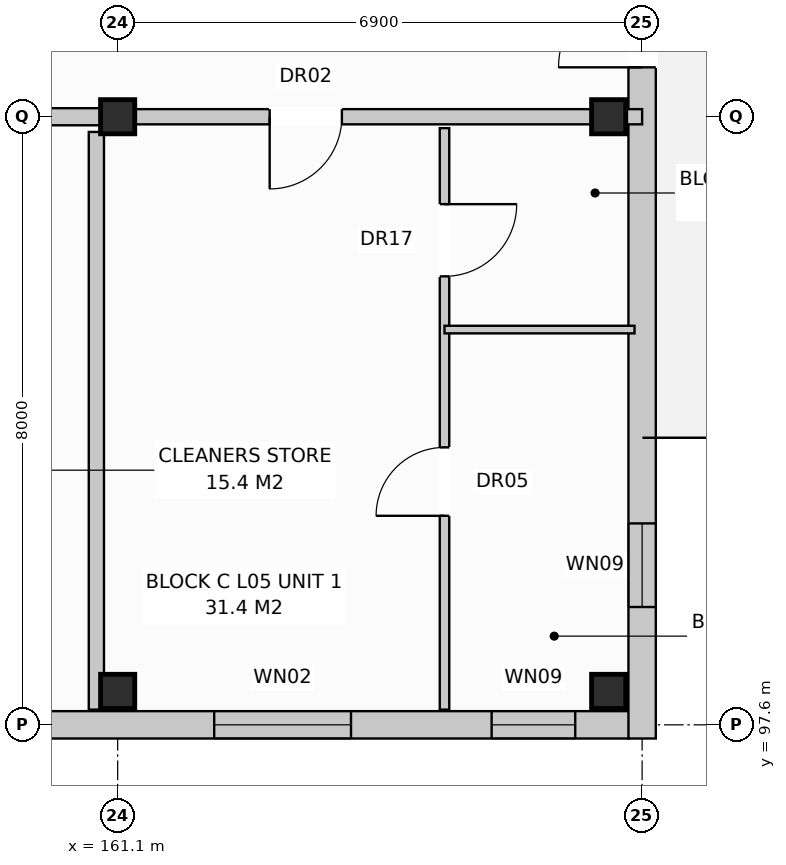
"""IFC4 building model, lengths in metres.
Left out: names, types, materials, properties, quantities, classifications, styles, units other than length and angle.
Written with IfcOpenShell. Run it as: python <this file> out.ifc"""

import sys

from ifc_helpers import new_model, si_unit, direction, frame, frame_2d, origin, origin_with_axes, origin_2d, place, context, subcontext, project, spatial, rectangle, extrude, element, fill, save


model = new_model("IFC4")
c1 = context("Model", 3, precision=1e-05, world=origin(), true_north=direction((0.0, 1.0)))
c2 = subcontext(c1, "Body", "Model", "MODEL_VIEW")
j1 = project(units=[si_unit("LENGTHUNIT", "METRE"), si_unit("PLANEANGLEUNIT", "RADIAN")], contexts=[c1])
p1 = place(None, origin())
s1 = spatial("IfcSite", under=j1, at=p1, CompositionType="ELEMENT")
p2 = place(p1, origin())
s2 = spatial("IfcBuilding", under=s1, at=p2, CompositionType="ELEMENT")
p3 = place(p2, frame((0.0, 0.0, 17.6)))
s3 = spatial("IfcBuildingStorey", under=s2, at=p3, CompositionType="ELEMENT", Elevation=17.6)
for number, where, z_axis, x_axis in (
    (1, (161.1, 98.04, 0.0), (0.0, 0.0, 1.0), (1.0, 0.0, 0.0)),
    (2, (161.1, 105.6, 0.0), (0.0, 0.0, 1.0), (1.0, 0.0, 0.0)),
    (3, (167.56, 98.04, 0.0), (0.0, 0.0, 1.0), (1.0, 0.0, 0.0)),
    (4, (167.56, 105.6, 0.0), (0.0, 0.0, 1.0), (1.0, 0.0, 0.0)),
):
    element("IfcColumn", number, at=place(p3, frame(where, z_axis=z_axis, x_axis=x_axis)), inside=s3, PredefinedType="COLUMN", context=c2, shape_type="SweptSolid", body=[
        extrude(rectangle(XDim=0.45, YDim=0.45, at=origin_2d()), origin(), (0.0, 0.0, 1.0), 3.2),
    ])
p4 = place(p3, frame((151.05, 97.6, 0.0), z_axis=(0.0, 0.0, 1.0), x_axis=(1.0, 0.0, 0.0)))
e5 = element("IfcWall", 5, at=p4, inside=s3, PredefinedType="STANDARD", context=c2, shape_type="SweptSolid", body=[
    extrude(rectangle(XDim=16.78, YDim=0.36, at=frame_2d((8.39, 0.0))), origin(), (0.0, 0.0, 1.0), 2.95),
])
p5 = place(p4, frame((11.32, 0.0, 0.8)))
e6 = element("IfcOpeningElement", 6, at=p5, cuts=e5, PredefinedType="OPENING", context=c2, shape_type="SweptSolid", body=[
    extrude(rectangle(XDim=1.8, YDim=1.7, at=frame_2d((0.9, 0.85))), frame((0.0, 0.192, 0.0), z_axis=(0.0, -1.0, 0.0), x_axis=(1.0, 0.0, 0.0)), (0.0, 0.0, 1.0), 0.384),
])
p6 = place(p4, frame((14.97, 0.0, 0.72)))
e7 = element("IfcOpeningElement", 7, at=p6, cuts=e5, PredefinedType="OPENING", context=c2, shape_type="SweptSolid", body=[
    extrude(rectangle(XDim=1.1, YDim=1.5, at=frame_2d((0.55, 0.75))), frame((0.0, 0.192, 0.0), z_axis=(0.0, -1.0, 0.0), x_axis=(1.0, 0.0, 0.0)), (0.0, 0.0, 1.0), 0.384),
])
p7 = place(p3, frame((168.0, 97.42, 0.0), z_axis=(0.0, 0.0, 1.0), x_axis=(0.0, 1.0, 0.0)))
e8 = element("IfcWall", 8, at=p7, inside=s3, PredefinedType="STANDARD", context=c2, shape_type="SweptSolid", body=[
    extrude(rectangle(XDim=18.76, YDim=0.36, at=frame_2d((9.38, 0.0))), origin(), (0.0, 0.0, 1.0), 2.95),
])
p8 = place(p7, frame((8.83, 0.0, 0.0)))
e9 = element("IfcOpeningElement", 9, at=p8, cuts=e8, PredefinedType="OPENING", context=c2, shape_type="SweptSolid", body=[
    extrude(rectangle(XDim=1.1, YDim=2.1, at=frame_2d((0.55, 1.05))), frame((0.0, 0.192, 0.0), z_axis=(0.0, -1.0, 0.0), x_axis=(1.0, 0.0, 0.0)), (0.0, 0.0, 1.0), 0.384),
])
p9 = place(p7, frame((1.73, 0.0, 0.72)))
e10 = element("IfcOpeningElement", 10, at=p9, cuts=e8, PredefinedType="OPENING", context=c2, shape_type="SweptSolid", body=[
    extrude(rectangle(XDim=1.1, YDim=1.5, at=frame_2d((0.55, 0.75))), frame((0.0, 0.192, 0.0), z_axis=(0.0, -1.0, 0.0), x_axis=(1.0, 0.0, 0.0)), (0.0, 0.0, 1.0), 0.384),
])
p10 = place(p7, frame((15.93, 0.0, 0.72)))
e11 = element("IfcOpeningElement", 11, at=p10, cuts=e8, PredefinedType="OPENING", context=c2, shape_type="SweptSolid", body=[
    extrude(rectangle(XDim=1.1, YDim=1.5, at=frame_2d((0.55, 0.75))), frame((0.0, 0.192, 0.0), z_axis=(0.0, -1.0, 0.0), x_axis=(1.0, 0.0, 0.0)), (0.0, 0.0, 1.0), 0.384),
])
p11 = place(p3, frame((160.82, 97.8, 0.0), z_axis=(0.0, 0.0, 1.0), x_axis=(0.0, 1.0, 0.0)))
e12 = element("IfcWall", 12, at=p11, inside=s3, PredefinedType="PARTITIONING", context=c2, shape_type="SweptSolid", body=[
    extrude(rectangle(XDim=7.6, YDim=0.2, at=frame_2d((3.8, 0.0))), origin(), (0.0, 0.0, 1.0), 2.39),
])
p12 = place(p3, frame((151.2, 105.6, 0.0), z_axis=(0.0, 0.0, 1.0), x_axis=(1.0, 0.0, 0.0)))
e13 = element("IfcWall", 13, at=p12, inside=s3, PredefinedType="PARTITIONING", context=c2, shape_type="SweptSolid", body=[
    extrude(rectangle(XDim=9.9, YDim=0.225, at=frame_2d((4.95, 0.0))), origin(), (0.0, 0.0, 1.0), 2.39),
])
p13 = place(p12, frame((0.475, 0.0, 0.0)))
e14 = element("IfcOpeningElement", 14, at=p13, cuts=e13, PredefinedType="OPENING", context=c2, shape_type="SweptSolid", body=[
    extrude(rectangle(XDim=1.1, YDim=2.15, at=frame_2d((0.55, 1.075))), frame((0.0, 0.125, 0.0), z_axis=(0.0, -1.0, 0.0), x_axis=(1.0, 0.0, 0.0)), (0.0, 0.0, 1.0), 0.249),
])
p14 = place(p12, frame((5.75, 0.0, 0.0)))
e15 = element("IfcOpeningElement", 15, at=p14, cuts=e13, PredefinedType="OPENING", context=c2, shape_type="SweptSolid", body=[
    extrude(rectangle(XDim=0.9, YDim=2.1, at=frame_2d((0.45, 1.05))), frame((0.0, 0.125, 0.0), z_axis=(0.0, -1.0, 0.0), x_axis=(1.0, 0.0, 0.0)), (0.0, 0.0, 1.0), 0.249),
])
p15 = place(p12, frame((7.8, 0.0, 0.0)))
e16 = element("IfcOpeningElement", 16, at=p15, cuts=e13, PredefinedType="OPENING", context=c2, shape_type="SweptSolid", body=[
    extrude(rectangle(XDim=0.95, YDim=2.15, at=frame_2d((0.475, 1.075))), frame((0.0, 0.125, 0.0), z_axis=(0.0, -1.0, 0.0), x_axis=(1.0, 0.0, 0.0)), (0.0, 0.0, 1.0), 0.249),
])
p16 = place(p3, frame((161.1, 105.6, 0.0), z_axis=(0.0, 0.0, 1.0), x_axis=(1.0, 0.0, 0.0)))
e17 = element("IfcWall", 17, at=p16, inside=s3, PredefinedType="PARTITIONING", context=c2, shape_type="SweptSolid", body=[
    extrude(rectangle(XDim=6.9, YDim=0.2, at=frame_2d((3.45, 0.0))), origin(), (0.0, 0.0, 1.0), 2.39),
])
p17 = place(p16, frame((2.0, 0.0, 0.0)))
e18 = element("IfcOpeningElement", 18, at=p17, cuts=e17, PredefinedType="OPENING", context=c2, shape_type="SweptSolid", body=[
    extrude(rectangle(XDim=0.95, YDim=2.15, at=frame_2d((0.475, 1.075))), frame((0.0, 0.112, 0.0), z_axis=(0.0, -1.0, 0.0), x_axis=(1.0, 0.0, 0.0)), (0.0, 0.0, 1.0), 0.224),
])
p18 = place(p3, frame((165.4, 105.45, 0.0), z_axis=(0.0, 0.0, 1.0), x_axis=(0.0, -1.0, 0.0)))
e19 = element("IfcWall", 19, at=p18, inside=s3, PredefinedType="PARTITIONING", context=c2, shape_type="SweptSolid", body=[
    extrude(rectangle(XDim=7.65, YDim=0.125, at=frame_2d((3.825, 0.0))), origin(), (0.0, 0.0, 1.0), 2.95),
])
p19 = place(p18, frame((1.0, 0.0, 0.0)))
e20 = element("IfcOpeningElement", 20, at=p19, cuts=e19, PredefinedType="OPENING", context=c2, shape_type="SweptSolid", body=[
    extrude(rectangle(XDim=0.95, YDim=2.1, at=frame_2d((0.475, 1.05))), frame((0.0, 0.074, 0.0), z_axis=(0.0, -1.0, 0.0), x_axis=(1.0, 0.0, 0.0)), (0.0, 0.0, 1.0), 0.149),
])
p20 = place(p18, frame((4.2, 0.0, 0.0)))
e21 = element("IfcOpeningElement", 21, at=p20, cuts=e19, PredefinedType="OPENING", context=c2, shape_type="SweptSolid", body=[
    extrude(rectangle(XDim=0.9, YDim=2.1, at=frame_2d((0.45, 1.05))), frame((0.0, 0.074, 0.0), z_axis=(0.0, -1.0, 0.0), x_axis=(1.0, 0.0, 0.0)), (0.0, 0.0, 1.0), 0.149),
])
p21 = place(p3, frame((165.4, 102.8, 0.0), z_axis=(0.0, 0.0, 1.0), x_axis=(1.0, 0.0, 0.0)))
e22 = element("IfcWall", 22, at=p21, inside=s3, PredefinedType="PARTITIONING", context=c2, shape_type="SweptSolid", body=[
    extrude(rectangle(XDim=2.5, YDim=0.1, at=frame_2d((1.25, 0.0))), origin(), (0.0, 0.0, 1.0), 2.95),
])
p22 = place(p5, origin_with_axes())
e23 = element("IfcWindow", 23, at=p22, inside=s3, PartitioningType="SINGLE_PANEL", PredefinedType="WINDOW", context=c2, shape_type="SweptSolid", body=[
    extrude(rectangle(XDim=1.8, YDim=1.7, at=frame_2d((0.9, 0.85))), frame((0.0, 0.03, 0.0), z_axis=(0.0, -1.0, 0.0), x_axis=(1.0, 0.0, 0.0)), (0.0, 0.0, 1.0), 0.06),
])
fill(e6, e23)
p23 = place(p6, origin_with_axes())
e24 = element("IfcWindow", 24, at=p23, inside=s3, PartitioningType="SINGLE_PANEL", PredefinedType="WINDOW", context=c2, shape_type="SweptSolid", body=[
    extrude(rectangle(XDim=1.1, YDim=1.5, at=frame_2d((0.55, 0.75))), frame((0.0, 0.03, 0.0), z_axis=(0.0, -1.0, 0.0), x_axis=(1.0, 0.0, 0.0)), (0.0, 0.0, 1.0), 0.06),
])
fill(e7, e24)
p24 = place(p8, origin_with_axes())
e25 = element("IfcDoor", 25, at=p24, inside=s3, OperationType="SINGLE_SWING_LEFT", PredefinedType="DOOR", context=c2, shape_type="SweptSolid", body=[
    extrude(rectangle(XDim=1.1, YDim=2.1, at=frame_2d((0.55, 1.05))), frame((0.0, 0.025, 0.0), z_axis=(0.0, -1.0, 0.0), x_axis=(1.0, 0.0, 0.0)), (0.0, 0.0, 1.0), 0.05),
])
fill(e9, e25)
p25 = place(p9, origin_with_axes())
e26 = element("IfcWindow", 26, at=p25, inside=s3, PartitioningType="SINGLE_PANEL", PredefinedType="WINDOW", context=c2, shape_type="SweptSolid", body=[
    extrude(rectangle(XDim=1.1, YDim=1.5, at=frame_2d((0.55, 0.75))), frame((0.0, 0.03, 0.0), z_axis=(0.0, -1.0, 0.0), x_axis=(1.0, 0.0, 0.0)), (0.0, 0.0, 1.0), 0.06),
])
fill(e10, e26)
p26 = place(p17, frame((0.95, 0.0, 0.0), z_axis=(0.0, 0.0, 1.0), x_axis=(-1.0, 0.0, 0.0)))
e27 = element("IfcDoor", 27, at=p26, inside=s3, OperationType="SINGLE_SWING_LEFT", PredefinedType="DOOR", context=c2, shape_type="SweptSolid", body=[
    extrude(rectangle(XDim=0.95, YDim=2.15, at=frame_2d((0.475, 1.075))), frame((0.0, 0.025, 0.0), z_axis=(0.0, -1.0, 0.0), x_axis=(1.0, 0.0, 0.0)), (0.0, 0.0, 1.0), 0.05),
])
fill(e18, e27)
p27 = place(p19, origin_with_axes())
e28 = element("IfcDoor", 28, at=p27, inside=s3, OperationType="SINGLE_SWING_LEFT", PredefinedType="DOOR", context=c2, shape_type="SweptSolid", body=[
    extrude(rectangle(XDim=0.95, YDim=2.1, at=frame_2d((0.475, 1.05))), frame((0.0, 0.025, 0.0), z_axis=(0.0, -1.0, 0.0), x_axis=(1.0, 0.0, 0.0)), (0.0, 0.0, 1.0), 0.05),
])
fill(e20, e28)
p28 = place(p20, frame((0.9, 0.0, 0.0), z_axis=(0.0, 0.0, 1.0), x_axis=(-1.0, 0.0, 0.0)))
e29 = element("IfcDoor", 29, at=p28, inside=s3, OperationType="SINGLE_SWING_RIGHT", PredefinedType="DOOR", context=c2, shape_type="SweptSolid", body=[
    extrude(rectangle(XDim=0.9, YDim=2.1, at=frame_2d((0.45, 1.05))), frame((0.0, 0.025, 0.0), z_axis=(0.0, -1.0, 0.0), x_axis=(1.0, 0.0, 0.0)), (0.0, 0.0, 1.0), 0.05),
])
fill(e21, e29)
save(model, sys.argv[1])
